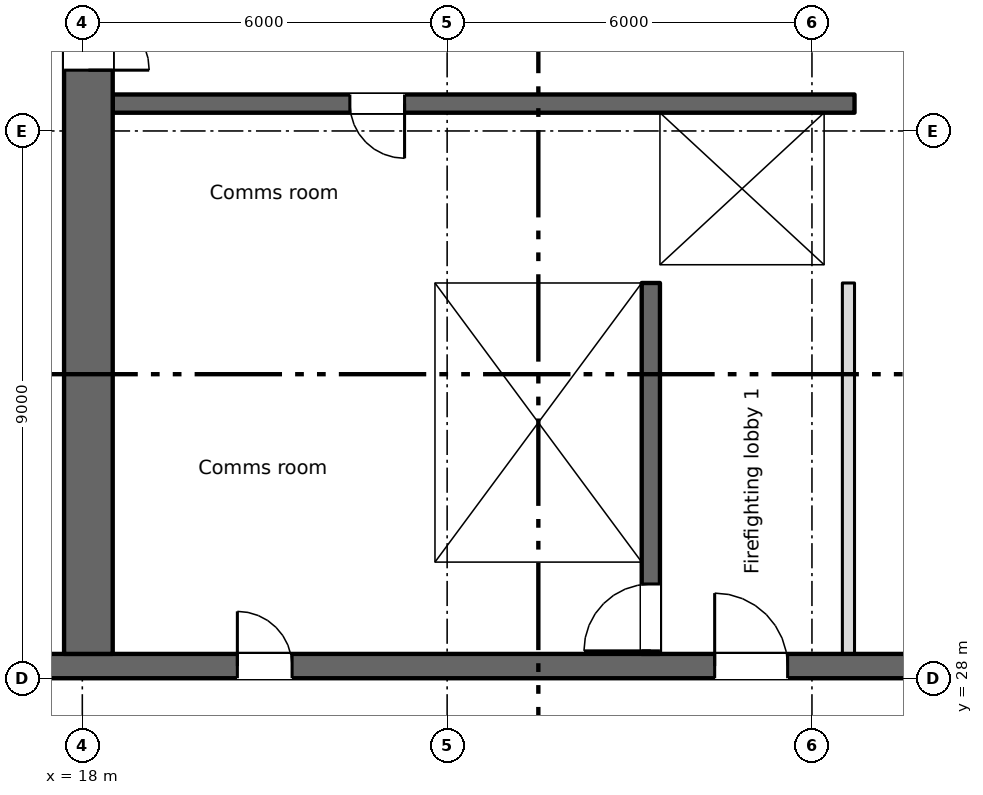
"""IFC4 building model, lengths in metres.
Left out: names, types, materials, properties, quantities, classifications, styles, units other than length and angle.
Written with IfcOpenShell. Run it as: python <this file> out.ifc"""

import sys

from ifc_helpers import new_model, si_unit, direction, frame, frame_2d, origin, place, context, subcontext, project, spatial, rectangle, extrude, element, fill, save


model = new_model("IFC4")
c1 = context("Model", 3, precision=1e-05, world=origin(), true_north=direction((0.0, 1.0)))
c2 = subcontext(c1, "Body", "Model", "MODEL_VIEW")
j1 = project(units=[si_unit("LENGTHUNIT", "METRE"), si_unit("PLANEANGLEUNIT", "RADIAN")], contexts=[c1])
p1 = place(None, origin())
s1 = spatial("IfcSite", under=j1, at=p1, CompositionType="ELEMENT")
p2 = place(p1, origin())
s2 = spatial("IfcBuilding", under=s1, at=p2, CompositionType="ELEMENT")
p3 = place(p2, frame((0.0, 0.0, 147.5)))
s3 = spatial("IfcBuildingStorey", under=s2, at=p3, CompositionType="ELEMENT", Elevation=147.5)
p4 = place(p3, frame((6.7, 28.2, 0.0), z_axis=(0.0, 0.0, 1.0), x_axis=(1.0, 0.0, 0.0)))
e1 = element("IfcWall", 1, at=p4, inside=s3, PredefinedType="SHEAR", context=c2, shape_type="SweptSolid", body=[
    extrude(rectangle(XDim=57.8, YDim=0.4, at=frame_2d((28.9, 0.0))), origin(), (0.0, 0.0, 1.0), 3.35),
])
p5 = place(p4, frame((13.85, 0.0, 0.0)))
e2 = element("IfcOpeningElement", 2, at=p5, cuts=e1, PredefinedType="OPENING", context=c2, shape_type="SweptSolid", body=[
    extrude(rectangle(XDim=0.9, YDim=2.1, at=frame_2d((0.45, 1.05))), frame((0.0, 0.21, 0.0), z_axis=(0.0, -1.0, 0.0), x_axis=(1.0, 0.0, 0.0)), (0.0, 0.0, 1.0), 0.42),
])
p6 = place(p4, frame((48.562, 0.0, 0.0)))
e3 = element("IfcOpeningElement", 3, at=p6, cuts=e1, PredefinedType="OPENING", context=c2, shape_type="SweptSolid", body=[
    extrude(rectangle(XDim=0.9, YDim=2.1, at=frame_2d((0.45, 1.05))), frame((0.0, 0.21, 0.0), z_axis=(0.0, -1.0, 0.0), x_axis=(1.0, 0.0, 0.0)), (0.0, 0.0, 1.0), 0.42),
])
p7 = place(p4, frame((51.137, 0.0, 0.0)))
e4 = element("IfcOpeningElement", 4, at=p7, cuts=e1, PredefinedType="OPENING", context=c2, shape_type="SweptSolid", body=[
    extrude(rectangle(XDim=0.9, YDim=2.1, at=frame_2d((0.45, 1.05))), frame((0.0, 0.21, 0.0), z_axis=(0.0, -1.0, 0.0), x_axis=(1.0, 0.0, 0.0)), (0.0, 0.0, 1.0), 0.42),
])
p8 = place(p4, frame((1.35, 0.0, 0.0)))
e5 = element("IfcOpeningElement", 5, at=p8, cuts=e1, PredefinedType="OPENING", context=c2, shape_type="SweptSolid", body=[
    extrude(rectangle(XDim=0.9, YDim=2.1, at=frame_2d((0.45, 1.05))), frame((0.0, 0.21, 0.0), z_axis=(0.0, -1.0, 0.0), x_axis=(1.0, 0.0, 0.0)), (0.0, 0.0, 1.0), 0.42),
])
p9 = place(p4, frame((4.7, 0.0, 0.0)))
e6 = element("IfcOpeningElement", 6, at=p9, cuts=e1, PredefinedType="OPENING", context=c2, shape_type="SweptSolid", body=[
    extrude(rectangle(XDim=1.2, YDim=2.1, at=frame_2d((0.6, 1.05))), frame((0.0, 0.21, 0.0), z_axis=(0.0, -1.0, 0.0), x_axis=(1.0, 0.0, 0.0)), (0.0, 0.0, 1.0), 0.42),
])
p10 = place(p4, frame((31.7, 0.0, 0.0)))
e7 = element("IfcOpeningElement", 7, at=p10, cuts=e1, PredefinedType="OPENING", context=c2, shape_type="SweptSolid", body=[
    extrude(rectangle(XDim=1.2, YDim=2.1, at=frame_2d((0.6, 1.05))), frame((0.0, 0.21, 0.0), z_axis=(0.0, -1.0, 0.0), x_axis=(1.0, 0.0, 0.0)), (0.0, 0.0, 1.0), 0.42),
])
p11 = place(p4, frame((55.2, 0.0, 0.0)))
e8 = element("IfcOpeningElement", 8, at=p11, cuts=e1, PredefinedType="OPENING", context=c2, shape_type="SweptSolid", body=[
    extrude(rectangle(XDim=1.2, YDim=2.1, at=frame_2d((0.6, 1.05))), frame((0.0, 0.21, 0.0), z_axis=(0.0, -1.0, 0.0), x_axis=(1.0, 0.0, 0.0)), (0.0, 0.0, 1.0), 0.42),
])
p12 = place(p4, frame((21.7, 0.0, 0.0)))
e9 = element("IfcOpeningElement", 9, at=p12, cuts=e1, PredefinedType="OPENING", context=c2, shape_type="SweptSolid", body=[
    extrude(rectangle(XDim=1.2, YDim=2.1, at=frame_2d((0.6, 1.05))), frame((0.0, 0.21, 0.0), z_axis=(0.0, -1.0, 0.0), x_axis=(1.0, 0.0, 0.0)), (0.0, 0.0, 1.0), 0.42),
])
p13 = place(p4, frame((41.7, 0.0, 0.0)))
e10 = element("IfcOpeningElement", 10, at=p13, cuts=e1, PredefinedType="OPENING", context=c2, shape_type="SweptSolid", body=[
    extrude(rectangle(XDim=1.2, YDim=2.1, at=frame_2d((0.6, 1.05))), frame((0.0, 0.21, 0.0), z_axis=(0.0, -1.0, 0.0), x_axis=(1.0, 0.0, 0.0)), (0.0, 0.0, 1.0), 0.42),
])
p14 = place(p4, frame((24.85, 0.0, 0.0)))
e11 = element("IfcOpeningElement", 11, at=p14, cuts=e1, PredefinedType="OPENING", context=c2, shape_type="SweptSolid", body=[
    extrude(rectangle(XDim=2.4, YDim=2.1, at=frame_2d((1.2, 1.05))), frame((0.0, 0.21, 0.0), z_axis=(0.0, -1.0, 0.0), x_axis=(1.0, 0.0, 0.0)), (0.0, 0.0, 1.0), 0.42),
])
p15 = place(p4, frame((37.35, 0.0, 0.0)))
e12 = element("IfcOpeningElement", 12, at=p15, cuts=e1, PredefinedType="OPENING", context=c2, shape_type="SweptSolid", body=[
    extrude(rectangle(XDim=2.4, YDim=2.1, at=frame_2d((1.2, 1.05))), frame((0.0, 0.21, 0.0), z_axis=(0.0, -1.0, 0.0), x_axis=(1.0, 0.0, 0.0)), (0.0, 0.0, 1.0), 0.42),
])
p16 = place(p4, frame((7.95, 0.0, 0.0)))
e13 = element("IfcOpeningElement", 13, at=p16, cuts=e1, PredefinedType="OPENING", context=c2, shape_type="SweptSolid", body=[
    extrude(rectangle(XDim=2.4, YDim=2.1, at=frame_2d((1.2, 1.05))), frame((0.0, 0.21, 0.0), z_axis=(0.0, -1.0, 0.0), x_axis=(1.0, 0.0, 0.0)), (0.0, 0.0, 1.0), 0.42),
])
p17 = place(p4, frame((28.85, 0.0, 0.0)))
e14 = element("IfcOpeningElement", 14, at=p17, cuts=e1, PredefinedType="OPENING", context=c2, shape_type="SweptSolid", body=[
    extrude(rectangle(XDim=0.9, YDim=2.1, at=frame_2d((0.45, 1.05))), frame((0.0, 0.21, 0.0), z_axis=(0.0, -1.0, 0.0), x_axis=(1.0, 0.0, 0.0)), (0.0, 0.0, 1.0), 0.42),
])
p18 = place(p4, frame((34.85, 0.0, 0.0)))
e15 = element("IfcOpeningElement", 15, at=p18, cuts=e1, PredefinedType="OPENING", context=c2, shape_type="SweptSolid", body=[
    extrude(rectangle(XDim=0.9, YDim=2.1, at=frame_2d((0.45, 1.05))), frame((0.0, 0.21, 0.0), z_axis=(0.0, -1.0, 0.0), x_axis=(1.0, 0.0, 0.0)), (0.0, 0.0, 1.0), 0.42),
])
p19 = place(p3, frame((18.1, 28.4, 0.0), z_axis=(0.0, 0.0, 1.0), x_axis=(0.0, 1.0, 0.0)))
e16 = element("IfcWall", 16, at=p19, inside=s3, PredefinedType="SHEAR", context=c2, shape_type="SweptSolid", body=[
    extrude(rectangle(XDim=16.8, YDim=0.8, at=frame_2d((8.4, 0.0))), origin(), (0.0, 0.0, 1.0), 3.35),
])
p20 = place(p19, frame((9.6, 0.0, 0.0)))
e17 = element("IfcOpeningElement", 17, at=p20, cuts=e16, PredefinedType="OPENING", context=c2, shape_type="SweptSolid", body=[
    extrude(rectangle(XDim=2.0, YDim=2.1, at=frame_2d((1.0, 1.05))), frame((0.0, 0.41, 0.0), z_axis=(0.0, -1.0, 0.0), x_axis=(1.0, 0.0, 0.0)), (0.0, 0.0, 1.0), 0.82),
])
p21 = place(p19, frame((15.35, 0.0, 0.0)))
e18 = element("IfcOpeningElement", 18, at=p21, cuts=e16, PredefinedType="OPENING", context=c2, shape_type="SweptSolid", body=[
    extrude(rectangle(XDim=1.2, YDim=2.1, at=frame_2d((0.6, 1.05))), frame((0.0, 0.41, 0.0), z_axis=(0.0, -1.0, 0.0), x_axis=(1.0, 0.0, 0.0)), (0.0, 0.0, 1.0), 0.82),
])
p22 = place(p3, frame((23.65, 28.4, 0.0), z_axis=(0.0, 0.0, 1.0), x_axis=(0.0, 1.0, 0.0)))
e19 = element("IfcWall", 19, at=p22, inside=s3, PredefinedType="SHEAR", context=c2, shape_type="SweptSolid", body=[
    extrude(rectangle(XDim=6.1, YDim=0.3, at=frame_2d((3.05, 0.0))), origin(), (0.0, 0.0, 1.0), 3.35),
])
p23 = place(p3, frame((27.35, 28.4, 0.0), z_axis=(0.0, 0.0, 1.0), x_axis=(0.0, 1.0, 0.0)))
e20 = element("IfcWall", 20, at=p23, inside=s3, PredefinedType="SHEAR", context=c2, shape_type="SweptSolid", body=[
    extrude(rectangle(XDim=6.1, YDim=0.3, at=frame_2d((3.05, 0.0))), origin(), (0.0, 0.0, 1.0), 3.35),
])
p24 = place(p23, frame((0.05, 0.0, 0.0)))
e21 = element("IfcOpeningElement", 21, at=p24, cuts=e20, PredefinedType="OPENING", context=c2, shape_type="SweptSolid", body=[
    extrude(rectangle(XDim=1.1, YDim=2.1, at=frame_2d((0.55, 1.05))), frame((0.0, 0.16, 0.0), z_axis=(0.0, -1.0, 0.0), x_axis=(1.0, 0.0, 0.0)), (0.0, 0.0, 1.0), 0.32),
])
p25 = place(p3, frame((18.5, 34.65, 0.0), z_axis=(0.0, 0.0, 1.0), x_axis=(1.0, 0.0, 0.0)))
e22 = element("IfcWall", 22, at=p25, inside=s3, PredefinedType="SHEAR", context=c2, shape_type="SweptSolid", body=[
    extrude(rectangle(XDim=12.2, YDim=0.3, at=frame_2d((6.1, 0.0))), origin(), (0.0, 0.0, 1.0), 3.35),
])
p26 = place(p25, frame((9.8, 0.0, 0.0)))
e23 = element("IfcOpeningElement", 23, at=p26, cuts=e22, PredefinedType="OPENING", context=c2, shape_type="SweptSolid", body=[
    extrude(rectangle(XDim=1.1, YDim=2.1, at=frame_2d((0.55, 1.05))), frame((0.0, 0.16, 0.0), z_axis=(0.0, -1.0, 0.0), x_axis=(1.0, 0.0, 0.0)), (0.0, 0.0, 1.0), 0.32),
])
p27 = place(p3, frame((30.7, 37.45, 0.0), z_axis=(0.0, 0.0, 1.0), x_axis=(-1.0, 0.0, 0.0)))
e24 = element("IfcWall", 24, at=p27, inside=s3, PredefinedType="SHEAR", context=c2, shape_type="SweptSolid", body=[
    extrude(rectangle(XDim=12.2, YDim=0.3, at=frame_2d((6.1, 0.0))), origin(), (0.0, 0.0, 1.0), 3.35),
])
p28 = place(p27, frame((7.4, 0.0, 0.0)))
e25 = element("IfcOpeningElement", 25, at=p28, cuts=e24, PredefinedType="OPENING", context=c2, shape_type="SweptSolid", body=[
    extrude(rectangle(XDim=0.9, YDim=2.1, at=frame_2d((0.45, 1.05))), frame((0.0, 0.16, 0.0), z_axis=(0.0, -1.0, 0.0), x_axis=(1.0, 0.0, 0.0)), (0.0, 0.0, 1.0), 0.32),
])
p29 = place(p3, frame((27.35, 34.8, 0.0), z_axis=(0.0, 0.0, 1.0), x_axis=(0.0, 1.0, 0.0)))
e26 = element("IfcWall", 26, at=p29, inside=s3, PredefinedType="SHEAR", context=c2, shape_type="SweptSolid", body=[
    extrude(rectangle(XDim=2.5, YDim=0.3, at=frame_2d((1.25, 0.0))), origin(), (0.0, 0.0, 1.0), 3.35),
])
p30 = place(p3, frame((30.45, 34.8, 0.0), z_axis=(0.0, 0.0, 1.0), x_axis=(0.0, 1.0, 0.0)))
e27 = element("IfcWall", 27, at=p30, inside=s3, PredefinedType="SHEAR", context=c2, shape_type="SweptSolid", body=[
    extrude(rectangle(XDim=2.5, YDim=0.5, at=frame_2d((1.25, 0.0))), origin(), (0.0, 0.0, 1.0), 3.35),
])
p31 = place(p3, frame((30.6, 28.4, 0.0), z_axis=(0.0, 0.0, 1.0), x_axis=(0.0, 1.0, 0.0)))
e28 = element("IfcWall", 28, at=p31, inside=s3, PredefinedType="PARTITIONING", context=c2, shape_type="SweptSolid", body=[
    extrude(rectangle(XDim=6.1, YDim=0.2, at=frame_2d((3.05, 0.0))), origin(), (0.0, 0.0, 1.0), 3.35),
])
p32 = place(p5, origin())
e29 = element("IfcDoor", 29, at=p32, inside=s3, OperationType="SINGLE_SWING_LEFT", PredefinedType="DOOR", context=c2, shape_type="SweptSolid", body=[
    extrude(rectangle(XDim=0.9, YDim=2.1, at=frame_2d((0.45, 1.05))), frame((0.0, 0.025, 0.0), z_axis=(0.0, -1.0, 0.0), x_axis=(1.0, 0.0, 0.0)), (0.0, 0.0, 1.0), 0.05),
])
fill(e2, e29)
p33 = place(p28, origin())
e30 = element("IfcDoor", 30, at=p33, inside=s3, OperationType="SINGLE_SWING_LEFT", PredefinedType="DOOR", context=c2, shape_type="SweptSolid", body=[
    extrude(rectangle(XDim=0.9, YDim=2.1, at=frame_2d((0.45, 1.05))), frame((0.0, 0.025, 0.0), z_axis=(0.0, -1.0, 0.0), x_axis=(1.0, 0.0, 0.0)), (0.0, 0.0, 1.0), 0.05),
])
fill(e25, e30)
p34 = place(p26, origin())
e31 = element("IfcDoor", 31, at=p34, inside=s3, OperationType="SLIDING_TO_LEFT", PredefinedType="DOOR", context=c2, shape_type="SweptSolid", body=[
    extrude(rectangle(XDim=1.1, YDim=2.1, at=frame_2d((0.55, 1.05))), frame((0.0, 0.025, 0.0), z_axis=(0.0, -1.0, 0.0), x_axis=(1.0, 0.0, 0.0)), (0.0, 0.0, 1.0), 0.05),
])
fill(e23, e31)
p35 = place(p24, origin())
e32 = element("IfcDoor", 32, at=p35, inside=s3, OperationType="SINGLE_SWING_LEFT", PredefinedType="DOOR", context=c2, shape_type="SweptSolid", body=[
    extrude(rectangle(XDim=1.1, YDim=2.1, at=frame_2d((0.55, 1.05))), frame((0.0, 0.025, 0.0), z_axis=(0.0, -1.0, 0.0), x_axis=(1.0, 0.0, 0.0)), (0.0, 0.0, 1.0), 0.05),
])
fill(e21, e32)
p36 = place(p12, origin())
e33 = element("IfcDoor", 33, at=p36, inside=s3, OperationType="SINGLE_SWING_LEFT", PredefinedType="DOOR", context=c2, shape_type="SweptSolid", body=[
    extrude(rectangle(XDim=1.2, YDim=2.1, at=frame_2d((0.6, 1.05))), frame((0.0, 0.025, 0.0), z_axis=(0.0, -1.0, 0.0), x_axis=(1.0, 0.0, 0.0)), (0.0, 0.0, 1.0), 0.05),
])
fill(e9, e33)
p37 = place(p20, origin())
e34 = element("IfcDoor", 34, at=p37, inside=s3, OperationType="DOUBLE_DOOR_SINGLE_SWING", PredefinedType="DOOR", context=c2, shape_type="SweptSolid", body=[
    extrude(rectangle(XDim=2.0, YDim=2.1, at=frame_2d((1.0, 1.05))), frame((0.0, 0.025, 0.0), z_axis=(0.0, -1.0, 0.0), x_axis=(1.0, 0.0, 0.0)), (0.0, 0.0, 1.0), 0.05),
])
fill(e17, e34)
save(model, sys.argv[1])
